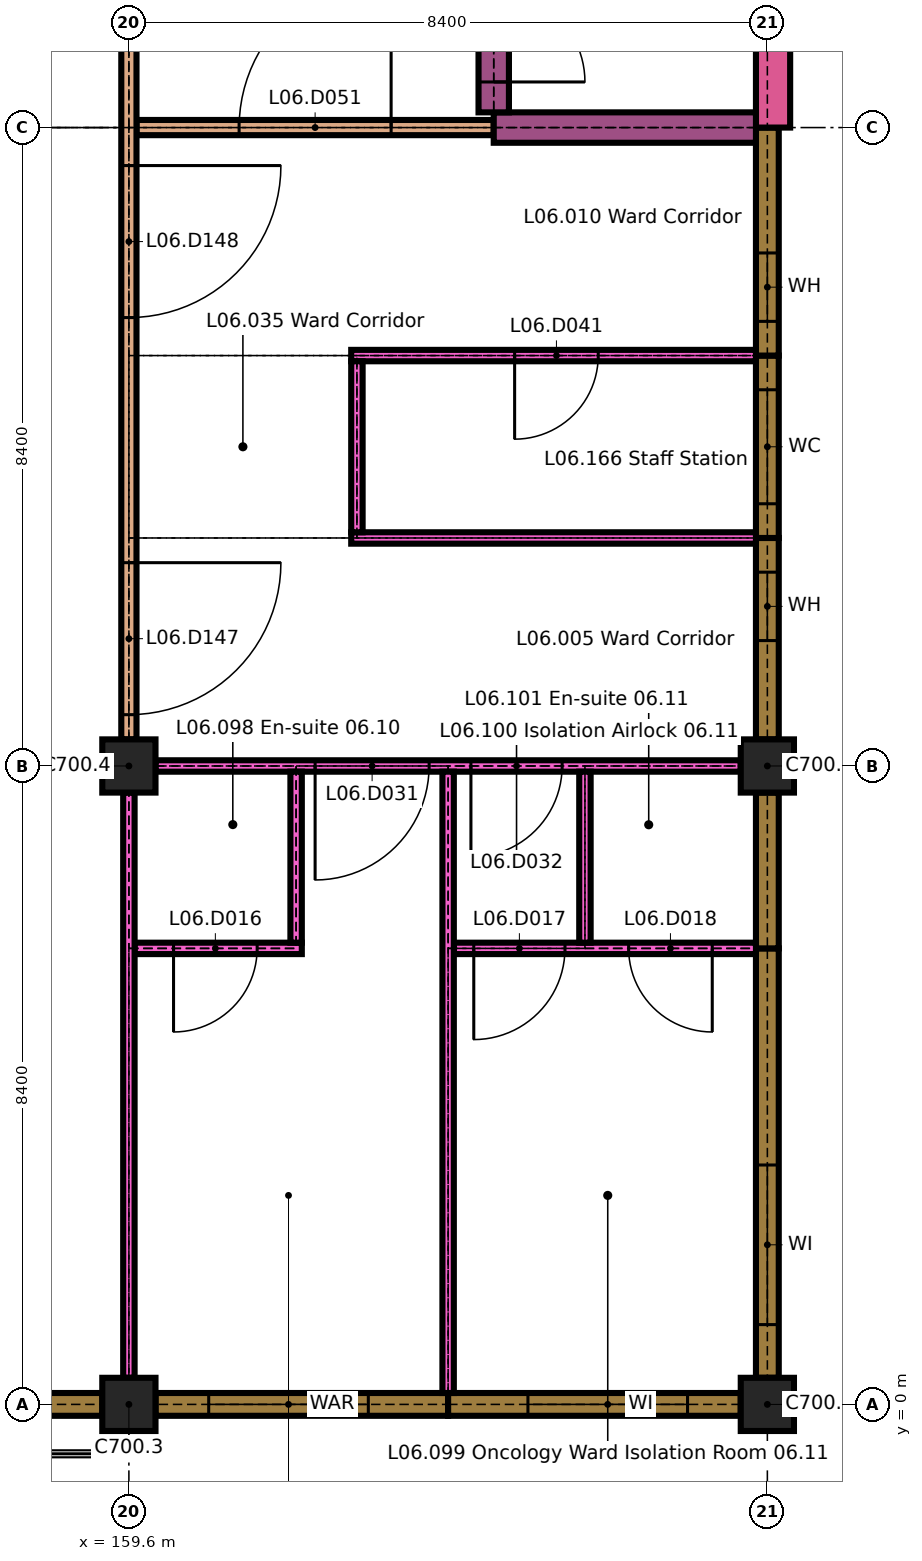
"""IFC4 building model, lengths in metres.
Left out: names, types, materials, properties, quantities, classifications, styles, units other than length and angle.
Written with IfcOpenShell. Run it as: python <this file> out.ifc"""

import sys

from ifc_helpers import new_model, si_unit, direction, frame, frame_2d, origin, origin_2d, place, context, subcontext, project, spatial, rectangle, extrude, element, fill, save


model = new_model("IFC4")
c1 = context("Model", 3, precision=1e-05, world=origin(), true_north=direction((0.0, 1.0)))
c2 = subcontext(c1, "Body", "Model", "MODEL_VIEW")
j1 = project(units=[si_unit("LENGTHUNIT", "METRE"), si_unit("PLANEANGLEUNIT", "RADIAN")], contexts=[c1])
p1 = place(None, origin())
s1 = spatial("IfcSite", under=j1, at=p1, CompositionType="ELEMENT")
p2 = place(p1, origin())
s2 = spatial("IfcBuilding", under=s1, at=p2, CompositionType="ELEMENT")
p3 = place(p2, frame((0.0, 0.0, 26.1)))
s3 = spatial("IfcBuildingStorey", under=s2, at=p3, CompositionType="ELEMENT", Elevation=26.1)
for number, where, z_axis, x_axis in (
    (1, (159.6, 0.0, 0.0), (0.0, 0.0, 1.0), (1.0, 0.0, 0.0)),
    (2, (168.0, 0.0, 0.0), (0.0, 0.0, 1.0), (1.0, 0.0, 0.0)),
):
    element("IfcColumn", number, at=place(p3, frame(where, z_axis=z_axis, x_axis=x_axis)), inside=s3, PredefinedType="COLUMN", context=c2, shape_type="SweptSolid", body=[
        extrude(rectangle(XDim=0.7, YDim=0.7, at=origin_2d()), origin(), (0.0, 0.0, 1.0), 3.2),
    ])
p4 = place(p3, frame((159.6, 8.4, 0.0), z_axis=(0.0, 0.0, 1.0), x_axis=(1.0, 0.0, 0.0)))
e3 = element("IfcColumn", 3, at=p4, inside=s3, PredefinedType="COLUMN", context=c2, shape_type="SweptSolid", body=[
    extrude(rectangle(XDim=0.7, YDim=0.7, at=origin_2d()), origin(), (0.0, 0.0, 1.0), 3.3),
])
p5 = place(p3, frame((168.0, 8.4, 0.0), z_axis=(0.0, 0.0, 1.0), x_axis=(1.0, 0.0, 0.0)))
e4 = element("IfcColumn", 4, at=p5, inside=s3, PredefinedType="COLUMN", context=c2, shape_type="SweptSolid", body=[
    extrude(rectangle(XDim=0.7, YDim=0.7, at=origin_2d()), origin(), (0.0, 0.0, 1.0), 3.2),
])
p6 = place(p3, frame((158.2, 0.0, 0.0), z_axis=(0.0, 0.0, 1.0), x_axis=(1.0, 0.0, 0.0)))
e5 = element("IfcWall", 5, at=p6, inside=s3, PredefinedType="SOLIDWALL", context=c2, shape_type="SweptSolid", body=[
    extrude(rectangle(XDim=1.05, YDim=0.3, at=frame_2d((0.525, 0.0))), origin(), (0.0, 0.0, 1.0), 2.9),
])
p7 = place(p3, frame((159.95, 0.0, 0.0), z_axis=(0.0, 0.0, 1.0), x_axis=(1.0, 0.0, 0.0)))
e6 = element("IfcWall", 6, at=p7, inside=s3, PredefinedType="SOLIDWALL", context=c2, shape_type="SweptSolid", body=[
    extrude(rectangle(XDim=3.85, YDim=0.3, at=frame_2d((1.925, 0.0))), origin(), (0.0, 0.0, 1.0), 2.9),
])
p8 = place(p7, frame((0.7, 0.0, 0.9)))
e7 = element("IfcOpeningElement", 7, at=p8, cuts=e6, PredefinedType="OPENING", context=c2, shape_type="SweptSolid", body=[
    extrude(rectangle(XDim=2.1, YDim=1.5, at=frame_2d((1.05, 0.75))), frame((0.0, 0.16, 0.0), z_axis=(0.0, -1.0, 0.0), x_axis=(1.0, 0.0, 0.0)), (0.0, 0.0, 1.0), 0.32),
])
p9 = place(p3, frame((163.8, 0.0, 0.0), z_axis=(0.0, 0.0, 1.0), x_axis=(1.0, 0.0, 0.0)))
e8 = element("IfcWall", 8, at=p9, inside=s3, PredefinedType="SOLIDWALL", context=c2, shape_type="SweptSolid", body=[
    extrude(rectangle(XDim=3.85, YDim=0.3, at=frame_2d((1.925, 0.0))), origin(), (0.0, 0.0, 1.0), 2.9),
])
p10 = place(p9, frame((1.05, 0.0, 0.9)))
e9 = element("IfcOpeningElement", 9, at=p10, cuts=e8, PredefinedType="OPENING", context=c2, shape_type="SweptSolid", body=[
    extrude(rectangle(XDim=2.1, YDim=1.5, at=frame_2d((1.05, 0.75))), frame((0.0, 0.16, 0.0), z_axis=(0.0, -1.0, 0.0), x_axis=(1.0, 0.0, 0.0)), (0.0, 0.0, 1.0), 0.32),
])
p11 = place(p3, frame((168.0, 0.35, 0.0), z_axis=(0.0, 0.0, 1.0), x_axis=(0.0, 1.0, 0.0)))
e10 = element("IfcWall", 10, at=p11, inside=s3, PredefinedType="SOLIDWALL", context=c2, shape_type="SweptSolid", body=[
    extrude(rectangle(XDim=5.65, YDim=0.3, at=frame_2d((2.825, 0.0))), origin(), (0.0, 0.0, 1.0), 2.9),
])
p12 = place(p11, frame((0.7, 0.0, 0.9)))
e11 = element("IfcOpeningElement", 11, at=p12, cuts=e10, PredefinedType="OPENING", context=c2, shape_type="SweptSolid", body=[
    extrude(rectangle(XDim=2.1, YDim=1.5, at=frame_2d((1.05, 0.75))), frame((0.0, 0.16, 0.0), z_axis=(0.0, -1.0, 0.0), x_axis=(1.0, 0.0, 0.0)), (0.0, 0.0, 1.0), 0.32),
])
p13 = place(p3, frame((168.0, 6.0, 0.0), z_axis=(0.0, 0.0, 1.0), x_axis=(0.0, 1.0, 0.0)))
e12 = element("IfcWall", 12, at=p13, inside=s3, PredefinedType="SOLIDWALL", context=c2, shape_type="SweptSolid", body=[
    extrude(rectangle(XDim=2.05, YDim=0.3, at=frame_2d((1.025, 0.0))), origin(), (0.0, 0.0, 1.0), 2.9),
])
p14 = place(p3, frame((168.0, 8.75, 0.0), z_axis=(0.0, 0.0, 1.0), x_axis=(0.0, 1.0, 0.0)))
e13 = element("IfcWall", 13, at=p14, inside=s3, PredefinedType="SOLIDWALL", context=c2, shape_type="SweptSolid", body=[
    extrude(rectangle(XDim=2.65, YDim=0.3, at=frame_2d((1.325, 0.0))), origin(), (0.0, 0.0, 1.0), 2.9),
])
p15 = place(p14, frame((1.3, 0.0, 0.9)))
e14 = element("IfcOpeningElement", 14, at=p15, cuts=e13, PredefinedType="OPENING", context=c2, shape_type="SweptSolid", body=[
    extrude(rectangle(XDim=0.9, YDim=1.5, at=frame_2d((0.45, 0.75))), frame((0.0, 0.16, 0.0), z_axis=(0.0, -1.0, 0.0), x_axis=(1.0, 0.0, 0.0)), (0.0, 0.0, 1.0), 0.32),
])
p16 = place(p3, frame((168.0, 11.4, 0.0), z_axis=(0.0, 0.0, 1.0), x_axis=(0.0, 1.0, 0.0)))
e15 = element("IfcWall", 15, at=p16, inside=s3, PredefinedType="SOLIDWALL", context=c2, shape_type="SweptSolid", body=[
    extrude(rectangle(XDim=2.4, YDim=0.3, at=frame_2d((1.2, 0.0))), origin(), (0.0, 0.0, 1.0), 2.9),
])
p17 = place(p16, frame((0.45, 0.0, 0.9)))
e16 = element("IfcOpeningElement", 16, at=p17, cuts=e15, PredefinedType="OPENING", context=c2, shape_type="SweptSolid", body=[
    extrude(rectangle(XDim=1.5, YDim=1.5, at=frame_2d((0.75, 0.75))), frame((0.0, 0.16, 0.0), z_axis=(0.0, -1.0, 0.0), x_axis=(1.0, 0.0, 0.0)), (0.0, 0.0, 1.0), 0.32),
])
p18 = place(p3, frame((168.0, 13.8, 0.0), z_axis=(0.0, 0.0, 1.0), x_axis=(0.0, 1.0, 0.0)))
e17 = element("IfcWall", 17, at=p18, inside=s3, PredefinedType="SOLIDWALL", context=c2, shape_type="SweptSolid", body=[
    extrude(rectangle(XDim=3.0, YDim=0.3, at=frame_2d((1.5, 0.0))), origin(), (0.0, 0.0, 1.0), 2.9),
])
p19 = place(p18, frame((0.45, 0.0, 0.9)))
e18 = element("IfcOpeningElement", 18, at=p19, cuts=e17, PredefinedType="OPENING", context=c2, shape_type="SweptSolid", body=[
    extrude(rectangle(XDim=0.9, YDim=1.5, at=frame_2d((0.45, 0.75))), frame((0.0, 0.16, 0.0), z_axis=(0.0, -1.0, 0.0), x_axis=(1.0, 0.0, 0.0)), (0.0, 0.0, 1.0), 0.32),
])
p20 = place(p3, frame((168.075, 16.8, 0.0), z_axis=(0.0, 0.0, 1.0), x_axis=(0.0, 1.0, 0.0)))
e19 = element("IfcWall", 19, at=p20, inside=s3, PredefinedType="SOLIDWALL", context=c2, shape_type="SweptSolid", body=[
    extrude(rectangle(XDim=3.15, YDim=0.45, at=frame_2d((1.575, 0.0))), origin(), (0.0, 0.0, 1.0), 3.3),
])
p21 = place(p3, frame((159.675, 6.0, 0.0), z_axis=(0.0, 0.0, 1.0), x_axis=(1.0, 0.0, 0.0)))
e20 = element("IfcWall", 20, at=p21, inside=s3, PredefinedType="PARTITIONING", context=c2, shape_type="SweptSolid", body=[
    extrude(rectangle(XDim=2.2, YDim=0.15, at=frame_2d((1.1, 0.0))), origin(), (0.0, 0.0, 1.0), 3.3),
])
p22 = place(p21, frame((0.512, 0.0, 0.0)))
e21 = element("IfcOpeningElement", 21, at=p22, cuts=e20, PredefinedType="OPENING", context=c2, shape_type="SweptSolid", body=[
    extrude(rectangle(XDim=1.1, YDim=2.1, at=frame_2d((0.55, 1.05))), frame((0.0, 0.085, 0.0), z_axis=(0.0, -1.0, 0.0), x_axis=(1.0, 0.0, 0.0)), (0.0, 0.0, 1.0), 0.17),
])
p23 = place(p3, frame((163.875, 6.0, 0.0), z_axis=(0.0, 0.0, 1.0), x_axis=(1.0, 0.0, 0.0)))
e22 = element("IfcWall", 22, at=p23, inside=s3, PredefinedType="PARTITIONING", context=c2, shape_type="SweptSolid", body=[
    extrude(rectangle(XDim=3.975, YDim=0.15, at=frame_2d((1.988, 0.0))), origin(), (0.0, 0.0, 1.0), 3.3),
])
p24 = place(p23, frame((0.262, 0.0, 0.0)))
e23 = element("IfcOpeningElement", 23, at=p24, cuts=e22, PredefinedType="OPENING", context=c2, shape_type="SweptSolid", body=[
    extrude(rectangle(XDim=1.2, YDim=2.1, at=frame_2d((0.6, 1.05))), frame((0.0, 0.085, 0.0), z_axis=(0.0, -1.0, 0.0), x_axis=(1.0, 0.0, 0.0)), (0.0, 0.0, 1.0), 0.17),
])
p25 = place(p23, frame((2.3, 0.0, 0.0)))
e24 = element("IfcOpeningElement", 24, at=p25, cuts=e22, PredefinedType="OPENING", context=c2, shape_type="SweptSolid", body=[
    extrude(rectangle(XDim=1.1, YDim=2.1, at=frame_2d((0.55, 1.05))), frame((0.0, 0.085, 0.0), z_axis=(0.0, -1.0, 0.0), x_axis=(1.0, 0.0, 0.0)), (0.0, 0.0, 1.0), 0.17),
])
p26 = place(p3, frame((159.95, 8.4, 0.0), z_axis=(0.0, 0.0, 1.0), x_axis=(1.0, 0.0, 0.0)))
e25 = element("IfcWall", 25, at=p26, inside=s3, PredefinedType="PARTITIONING", context=c2, shape_type="SweptSolid", body=[
    extrude(rectangle(XDim=7.7, YDim=0.15, at=frame_2d((3.85, 0.0))), origin(), (0.0, 0.0, 1.0), 3.3),
])
p27 = place(p26, frame((2.1, 0.0, 0.0)))
e26 = element("IfcOpeningElement", 26, at=p27, cuts=e25, PredefinedType="OPENING", context=c2, shape_type="SweptSolid", body=[
    extrude(rectangle(XDim=1.5, YDim=2.4, at=frame_2d((0.75, 1.2))), frame((0.0, 0.085, 0.0), z_axis=(0.0, -1.0, 0.0), x_axis=(1.0, 0.0, 0.0)), (0.0, 0.0, 1.0), 0.17),
])
p28 = place(p26, frame((4.15, 0.0, 0.0)))
e27 = element("IfcOpeningElement", 27, at=p28, cuts=e25, PredefinedType="OPENING", context=c2, shape_type="SweptSolid", body=[
    extrude(rectangle(XDim=1.2, YDim=2.1, at=frame_2d((0.6, 1.05))), frame((0.0, 0.085, 0.0), z_axis=(0.0, -1.0, 0.0), x_axis=(1.0, 0.0, 0.0)), (0.0, 0.0, 1.0), 0.17),
])
p29 = place(p3, frame((162.525, 11.4, 0.0), z_axis=(0.0, 0.0, 1.0), x_axis=(1.0, 0.0, 0.0)))
e28 = element("IfcWall", 28, at=p29, inside=s3, PredefinedType="PARTITIONING", context=c2, shape_type="SweptSolid", body=[
    extrude(rectangle(XDim=5.325, YDim=0.15, at=frame_2d((2.663, 0.0))), origin(), (0.0, 0.0, 1.0), 3.3),
])
p30 = place(p3, frame((162.525, 13.8, 0.0), z_axis=(0.0, 0.0, 1.0), x_axis=(1.0, 0.0, 0.0)))
e29 = element("IfcWall", 29, at=p30, inside=s3, PredefinedType="PARTITIONING", context=c2, shape_type="SweptSolid", body=[
    extrude(rectangle(XDim=5.325, YDim=0.15, at=frame_2d((2.663, 0.0))), origin(), (0.0, 0.0, 1.0), 3.3),
])
p31 = place(p30, frame((2.15, 0.0, 0.0)))
e30 = element("IfcOpeningElement", 30, at=p31, cuts=e29, PredefinedType="OPENING", context=c2, shape_type="SweptSolid", body=[
    extrude(rectangle(XDim=1.1, YDim=2.1, at=frame_2d((0.55, 1.05))), frame((0.0, 0.085, 0.0), z_axis=(0.0, -1.0, 0.0), x_axis=(1.0, 0.0, 0.0)), (0.0, 0.0, 1.0), 0.17),
])
p32 = place(p3, frame((159.7, 16.8, 0.0), z_axis=(0.0, 0.0, 1.0), x_axis=(1.0, 0.0, 0.0)))
e31 = element("IfcWall", 31, at=p32, inside=s3, PredefinedType="PARTITIONING", context=c2, shape_type="SweptSolid", body=[
    extrude(rectangle(XDim=4.7, YDim=0.2, at=frame_2d((2.35, 0.0))), origin(), (0.0, 0.0, 1.0), 3.3),
])
p33 = place(p32, frame((1.35, 0.0, 0.0)))
e32 = element("IfcOpeningElement", 32, at=p33, cuts=e31, PredefinedType="OPENING", context=c2, shape_type="SweptSolid", body=[
    extrude(rectangle(XDim=2.0, YDim=2.4, at=frame_2d((1.0, 1.2))), frame((0.0, 0.11, 0.0), z_axis=(0.0, -1.0, 0.0), x_axis=(1.0, 0.0, 0.0)), (0.0, 0.0, 1.0), 0.22),
])
p34 = place(p3, frame((164.4, 16.8, 0.0), z_axis=(0.0, 0.0, 1.0), x_axis=(1.0, 0.0, 0.0)))
e33 = element("IfcWall", 33, at=p34, inside=s3, PredefinedType="SHEAR", context=c2, shape_type="SweptSolid", body=[
    extrude(rectangle(XDim=3.45, YDim=0.4, at=frame_2d((1.725, 0.0))), origin(), (0.0, 0.0, 1.0), 3.3),
])
p35 = place(p3, frame((159.6, 0.35, 0.0), z_axis=(0.0, 0.0, 1.0), x_axis=(0.0, 1.0, 0.0)))
e34 = element("IfcWall", 34, at=p35, inside=s3, PredefinedType="PARTITIONING", context=c2, shape_type="SweptSolid", body=[
    extrude(rectangle(XDim=7.7, YDim=0.15, at=frame_2d((3.85, 0.0))), origin(), (0.0, 0.0, 1.0), 3.3),
])
p36 = place(p3, frame((159.6, 8.75, 0.0), z_axis=(0.0, 0.0, 1.0), x_axis=(0.0, 1.0, 0.0)))
e35 = element("IfcWall", 35, at=p36, inside=s3, PredefinedType="PARTITIONING", context=c2, shape_type="SweptSolid", body=[
    extrude(rectangle(XDim=16.3, YDim=0.2, at=frame_2d((8.15, 0.0))), origin(), (0.0, 0.0, 1.0), 3.3),
])
p37 = place(p36, frame((0.325, 0.0, 0.0)))
e36 = element("IfcOpeningElement", 36, at=p37, cuts=e35, PredefinedType="OPENING", context=c2, shape_type="SweptSolid", body=[
    extrude(rectangle(XDim=2.0, YDim=2.4, at=frame_2d((1.0, 1.2))), frame((0.0, 0.11, 0.0), z_axis=(0.0, -1.0, 0.0), x_axis=(1.0, 0.0, 0.0)), (0.0, 0.0, 1.0), 0.22),
])
p38 = place(p36, frame((5.55, 0.0, 0.0)))
e37 = element("IfcOpeningElement", 37, at=p38, cuts=e35, PredefinedType="OPENING", context=c2, shape_type="SweptSolid", body=[
    extrude(rectangle(XDim=2.0, YDim=2.4, at=frame_2d((1.0, 1.2))), frame((0.0, 0.11, 0.0), z_axis=(0.0, -1.0, 0.0), x_axis=(1.0, 0.0, 0.0)), (0.0, 0.0, 1.0), 0.22),
])
for number, where, z_axis, x_axis in (
    (38, (161.8, 6.075, 0.0), (0.0, 0.0, 1.0), (0.0, 1.0, 0.0)),
    (39, (162.6, 11.475, 0.0), (0.0, 0.0, 1.0), (0.0, 1.0, 0.0)),
):
    element("IfcWall", number, at=place(p3, frame(where, z_axis=z_axis, x_axis=x_axis)), inside=s3, PredefinedType="PARTITIONING", context=c2, shape_type="SweptSolid", body=[
        extrude(rectangle(XDim=2.25, YDim=0.15, at=frame_2d((1.125, 0.0))), origin(), (0.0, 0.0, 1.0), 3.3),
    ])
p39 = place(p3, frame((163.8, 0.15, 0.0), z_axis=(0.0, 0.0, 1.0), x_axis=(0.0, 1.0, 0.0)))
e40 = element("IfcWall", 40, at=p39, inside=s3, PredefinedType="PARTITIONING", context=c2, shape_type="SweptSolid", body=[
    extrude(rectangle(XDim=8.175, YDim=0.15, at=frame_2d((4.087, 0.0))), origin(), (0.0, 0.0, 1.0), 3.3),
])
p40 = place(p3, frame((164.4, 17.0, 0.0), z_axis=(0.0, 0.0, 1.0), x_axis=(0.0, 1.0, 0.0)))
e41 = element("IfcWall", 41, at=p40, inside=s3, PredefinedType="SHEAR", context=c2, shape_type="SweptSolid", body=[
    extrude(rectangle(XDim=8.05, YDim=0.4, at=frame_2d((4.025, 0.0))), origin(), (0.0, 0.0, 1.0), 3.3),
])
p41 = place(p40, frame((0.4, 0.0, 0.0)))
e42 = element("IfcOpeningElement", 42, at=p41, cuts=e41, PredefinedType="OPENING", context=c2, shape_type="SweptSolid", body=[
    extrude(rectangle(XDim=1.2, YDim=2.1, at=frame_2d((0.6, 1.05))), frame((0.0, 0.21, 0.0), z_axis=(0.0, -1.0, 0.0), x_axis=(1.0, 0.0, 0.0)), (0.0, 0.0, 1.0), 0.42),
])
p42 = place(p3, frame((165.6, 6.075, 0.0), z_axis=(0.0, 0.0, 1.0), x_axis=(0.0, 1.0, 0.0)))
e43 = element("IfcWall", 43, at=p42, inside=s3, PredefinedType="PARTITIONING", context=c2, shape_type="SweptSolid", body=[
    extrude(rectangle(XDim=2.25, YDim=0.15, at=frame_2d((1.125, 0.0))), origin(), (0.0, 0.0, 1.0), 3.3),
])
p43 = place(p8, origin())
e44 = element("IfcWindow", 44, at=p43, inside=s3, PartitioningType="DOUBLE_PANEL_VERTICAL", PredefinedType="WINDOW", context=c2, shape_type="SweptSolid", body=[
    extrude(rectangle(XDim=2.1, YDim=1.5, at=frame_2d((1.05, 0.75))), frame((0.0, 0.05, 0.0), z_axis=(0.0, -1.0, 0.0), x_axis=(1.0, 0.0, 0.0)), (0.0, 0.0, 1.0), 0.1),
])
fill(e7, e44)
p44 = place(p10, origin())
e45 = element("IfcWindow", 45, at=p44, inside=s3, PartitioningType="SINGLE_PANEL", PredefinedType="WINDOW", context=c2, shape_type="SweptSolid", body=[
    extrude(rectangle(XDim=2.1, YDim=1.5, at=frame_2d((1.05, 0.75))), frame((0.0, 0.045, 0.0), z_axis=(0.0, -1.0, 0.0), x_axis=(1.0, 0.0, 0.0)), (0.0, 0.0, 1.0), 0.09),
])
fill(e9, e45)
p45 = place(p12, origin())
e46 = element("IfcWindow", 46, at=p45, inside=s3, PartitioningType="SINGLE_PANEL", PredefinedType="WINDOW", context=c2, shape_type="SweptSolid", body=[
    extrude(rectangle(XDim=2.1, YDim=1.5, at=frame_2d((1.05, 0.75))), frame((0.0, 0.045, 0.0), z_axis=(0.0, -1.0, 0.0), x_axis=(1.0, 0.0, 0.0)), (0.0, 0.0, 1.0), 0.09),
])
fill(e11, e46)
p46 = place(p15, origin())
e47 = element("IfcWindow", 47, at=p46, inside=s3, PartitioningType="SINGLE_PANEL", PredefinedType="WINDOW", context=c2, shape_type="SweptSolid", body=[
    extrude(rectangle(XDim=0.9, YDim=1.5, at=frame_2d((0.45, 0.75))), frame((0.0, 0.03, 0.0), z_axis=(0.0, -1.0, 0.0), x_axis=(1.0, 0.0, 0.0)), (0.0, 0.0, 1.0), 0.06),
])
fill(e14, e47)
p47 = place(p17, origin())
e48 = element("IfcWindow", 48, at=p47, inside=s3, PartitioningType="SINGLE_PANEL", PredefinedType="WINDOW", context=c2, shape_type="SweptSolid", body=[
    extrude(rectangle(XDim=1.5, YDim=1.5, at=frame_2d((0.75, 0.75))), frame((0.0, 0.03, 0.0), z_axis=(0.0, -1.0, 0.0), x_axis=(1.0, 0.0, 0.0)), (0.0, 0.0, 1.0), 0.06),
])
fill(e16, e48)
p48 = place(p19, origin())
e49 = element("IfcWindow", 49, at=p48, inside=s3, PartitioningType="SINGLE_PANEL", PredefinedType="WINDOW", context=c2, shape_type="SweptSolid", body=[
    extrude(rectangle(XDim=0.9, YDim=1.5, at=frame_2d((0.45, 0.75))), frame((0.0, 0.03, 0.0), z_axis=(0.0, -1.0, 0.0), x_axis=(1.0, 0.0, 0.0)), (0.0, 0.0, 1.0), 0.06),
])
fill(e18, e49)
p49 = place(p22, origin())
e50 = element("IfcDoor", 50, at=p49, inside=s3, OperationType="SINGLE_SWING_LEFT", PredefinedType="DOOR", context=c2, shape_type="SweptSolid", body=[
    extrude(rectangle(XDim=1.1, YDim=2.1, at=frame_2d((0.55, 1.05))), frame((0.0, 0.025, 0.0), z_axis=(0.0, -1.0, 0.0), x_axis=(1.0, 0.0, 0.0)), (0.0, 0.0, 1.0), 0.05),
])
fill(e21, e50)
p50 = place(p24, origin())
e51 = element("IfcDoor", 51, at=p50, inside=s3, OperationType="SINGLE_SWING_LEFT", PredefinedType="DOOR", context=c2, shape_type="SweptSolid", body=[
    extrude(rectangle(XDim=1.2, YDim=2.1, at=frame_2d((0.6, 1.05))), frame((0.0, 0.05, 0.0), z_axis=(0.0, -1.0, 0.0), x_axis=(1.0, 0.0, 0.0)), (0.0, 0.0, 1.0), 0.1),
])
fill(e23, e51)
p51 = place(p25, origin())
e52 = element("IfcDoor", 52, at=p51, inside=s3, OperationType="SINGLE_SWING_RIGHT", PredefinedType="DOOR", context=c2, shape_type="SweptSolid", body=[
    extrude(rectangle(XDim=1.1, YDim=2.1, at=frame_2d((0.55, 1.05))), frame((0.0, 0.025, 0.0), z_axis=(0.0, -1.0, 0.0), x_axis=(1.0, 0.0, 0.0)), (0.0, 0.0, 1.0), 0.05),
])
fill(e24, e52)
p52 = place(p27, origin())
e53 = element("IfcDoor", 53, at=p52, inside=s3, OperationType="SINGLE_SWING_LEFT", PredefinedType="DOOR", context=c2, shape_type="SweptSolid", body=[
    extrude(rectangle(XDim=1.5, YDim=2.4, at=frame_2d((0.75, 1.2))), frame((0.0, 0.03, 0.0), z_axis=(0.0, -1.0, 0.0), x_axis=(1.0, 0.0, 0.0)), (0.0, 0.0, 1.0), 0.06),
])
fill(e26, e53)
p53 = place(p28, origin())
e54 = element("IfcDoor", 54, at=p53, inside=s3, OperationType="SINGLE_SWING_LEFT", PredefinedType="DOOR", context=c2, shape_type="SweptSolid", body=[
    extrude(rectangle(XDim=1.2, YDim=2.1, at=frame_2d((0.6, 1.05))), frame((0.0, 0.05, 0.0), z_axis=(0.0, -1.0, 0.0), x_axis=(1.0, 0.0, 0.0)), (0.0, 0.0, 1.0), 0.1),
])
fill(e27, e54)
p54 = place(p31, origin())
e55 = element("IfcDoor", 55, at=p54, inside=s3, OperationType="SINGLE_SWING_LEFT", PredefinedType="DOOR", context=c2, shape_type="SweptSolid", body=[
    extrude(rectangle(XDim=1.1, YDim=2.1, at=frame_2d((0.55, 1.05))), frame((0.0, 0.025, 0.0), z_axis=(0.0, -1.0, 0.0), x_axis=(1.0, 0.0, 0.0)), (0.0, 0.0, 1.0), 0.05),
])
fill(e30, e55)
p55 = place(p33, origin())
e56 = element("IfcDoor", 56, at=p55, inside=s3, OperationType="SINGLE_SWING_LEFT", PredefinedType="DOOR", context=c2, shape_type="SweptSolid", body=[
    extrude(rectangle(XDim=2.0, YDim=2.4, at=frame_2d((1.0, 1.2))), frame((0.0, 0.03, 0.0), z_axis=(0.0, -1.0, 0.0), x_axis=(1.0, 0.0, 0.0)), (0.0, 0.0, 1.0), 0.06),
])
fill(e32, e56)
p56 = place(p37, origin())
e57 = element("IfcDoor", 57, at=p56, inside=s3, OperationType="SINGLE_SWING_RIGHT", PredefinedType="DOOR", context=c2, shape_type="SweptSolid", body=[
    extrude(rectangle(XDim=2.0, YDim=2.4, at=frame_2d((1.0, 1.2))), frame((0.0, 0.03, 0.0), z_axis=(0.0, -1.0, 0.0), x_axis=(1.0, 0.0, 0.0)), (0.0, 0.0, 1.0), 0.06),
])
fill(e36, e57)
p57 = place(p38, origin())
e58 = element("IfcDoor", 58, at=p57, inside=s3, OperationType="SINGLE_SWING_RIGHT", PredefinedType="DOOR", context=c2, shape_type="SweptSolid", body=[
    extrude(rectangle(XDim=2.0, YDim=2.4, at=frame_2d((1.0, 1.2))), frame((0.0, 0.03, 0.0), z_axis=(0.0, -1.0, 0.0), x_axis=(1.0, 0.0, 0.0)), (0.0, 0.0, 1.0), 0.06),
])
fill(e37, e58)
p58 = place(p41, origin())
e59 = element("IfcDoor", 59, at=p58, inside=s3, OperationType="SINGLE_SWING_LEFT", PredefinedType="DOOR", context=c2, shape_type="SweptSolid", body=[
    extrude(rectangle(XDim=1.2, YDim=2.1, at=frame_2d((0.6, 1.05))), frame((0.0, 0.025, 0.0), z_axis=(0.0, -1.0, 0.0), x_axis=(1.0, 0.0, 0.0)), (0.0, 0.0, 1.0), 0.05),
])
fill(e42, e59)
save(model, sys.argv[1])
